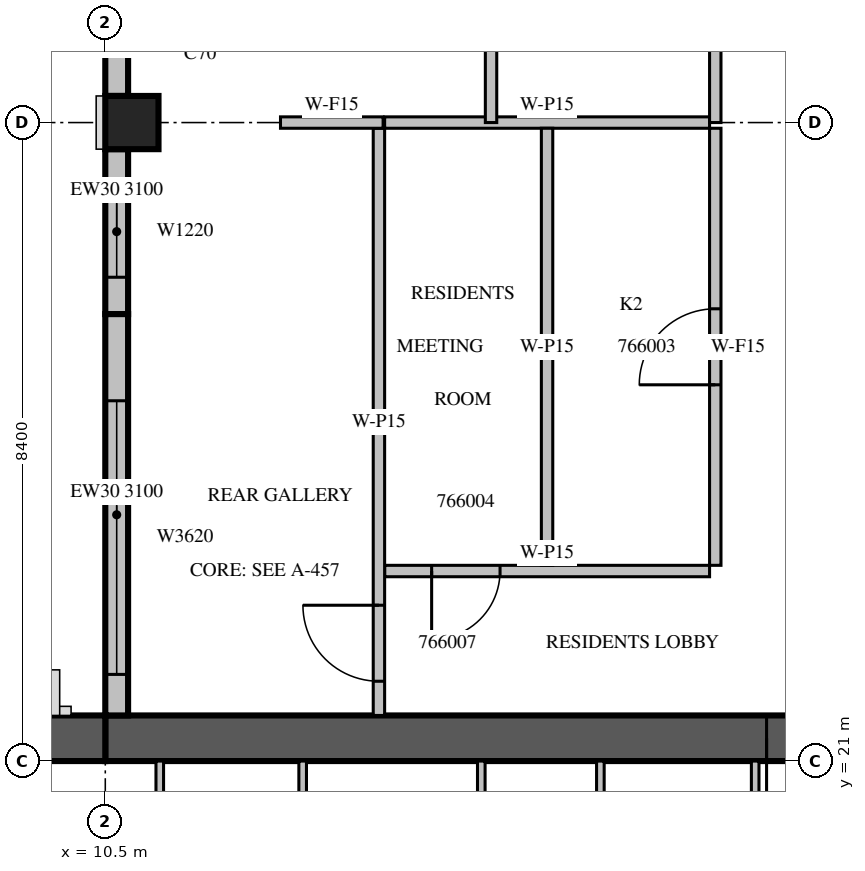
"""IFC4 building model, lengths in metres.
Left out: names, types, materials, properties, quantities, classifications, styles, units other than length and angle.
Written with IfcOpenShell. Run it as: python <this file> out.ifc"""

import sys

from ifc_helpers import new_model, si_unit, direction, frame, frame_2d, origin, origin_2d, place, context, subcontext, project, spatial, rectangle, extrude, source, transform, mapped, element, fill, save


model = new_model("IFC4")
c1 = context("Model", 3, precision=1e-05, world=origin(), true_north=direction((0.0, 1.0)))
c2 = subcontext(c1, "Body", "Model", "MODEL_VIEW")
j1 = project(units=[si_unit("LENGTHUNIT", "METRE"), si_unit("PLANEANGLEUNIT", "RADIAN")], contexts=[c1])
p1 = place(None, origin())
s1 = spatial("IfcSite", under=j1, at=p1, CompositionType="ELEMENT")
p2 = place(p1, origin())
s2 = spatial("IfcBuilding", under=s1, at=p2, CompositionType="ELEMENT")
p3 = place(p2, frame((0.0, 0.0, 291.5)))
s3 = spatial("IfcBuildingStorey", under=s2, at=p3, CompositionType="ELEMENT", Elevation=291.5)
m1 = source(origin(), c2, "Body", "SweptSolid", [
    extrude(rectangle(XDim=0.7, YDim=0.7, at=origin_2d()), origin(), (0.0, 0.0, 1.0), 3.5),
])
p4 = place(p3, frame((10.85, 29.4, 0.0), z_axis=(0.0, 0.0, 1.0), x_axis=(1.0, 0.0, 0.0)))
e1 = element("IfcColumn", 1, at=p4, inside=s3, PredefinedType="COLUMN", context=c2, shape_type="MappedRepresentation", body=[
    mapped(m1, transform((0.0, 0.0, 0.0), scale=1.0)),
])
m2 = source(origin(), c2, "Body", "SweptSolid", [
    extrude(rectangle(XDim=11.1, YDim=0.6, at=frame_2d((5.55, 0.0))), origin(), (0.0, 0.0, 1.0), 3.5),
])
p5 = place(p3, frame((10.5, 21.3, 0.0), z_axis=(0.0, 0.0, 1.0), x_axis=(1.0, 0.0, 0.0)))
e2 = element("IfcWall", 2, at=p5, inside=s3, PredefinedType="SHEAR", context=c2, shape_type="MappedRepresentation", body=[
    mapped(m2, transform((0.0, 0.0, 0.0), scale=1.0)),
])
m3 = source(origin(), c2, "Body", "SweptSolid", [
    extrude(rectangle(XDim=1.2, YDim=2.1, at=frame_2d((0.6, 1.05))), frame((0.0, 0.31, 0.0), z_axis=(0.0, -1.0, 0.0), x_axis=(1.0, 0.0, 0.0)), (0.0, 0.0, 1.0), 0.62),
])
p6 = place(p5, frame((8.7, 0.0, 0.0)))
e3 = element("IfcOpeningElement", 3, at=p6, cuts=e2, PredefinedType="OPENING", context=c2, shape_type="MappedRepresentation", body=[
    mapped(m3, transform((0.0, 0.0, 0.0), scale=1.0)),
])
m4 = source(origin(), c2, "Body", "SweptSolid", [
    extrude(rectangle(XDim=6.6, YDim=0.6, at=frame_2d((3.3, 0.0))), origin(), (0.0, 0.0, 1.0), 3.5),
])
p7 = place(p3, frame((3.9, 21.3, 0.0), z_axis=(0.0, 0.0, 1.0), x_axis=(1.0, 0.0, 0.0)))
e4 = element("IfcWall", 4, at=p7, inside=s3, PredefinedType="SHEAR", context=c2, shape_type="MappedRepresentation", body=[
    mapped(m4, transform((0.0, 0.0, 0.0), scale=1.0)),
])
m5 = source(origin(), c2, "Body", "SweptSolid", [
    extrude(rectangle(XDim=1.2, YDim=2.4, at=frame_2d((0.6, 1.2))), frame((0.0, 0.31, 0.0), z_axis=(0.0, -1.0, 0.0), x_axis=(1.0, 0.0, 0.0)), (0.0, 0.0, 1.0), 0.62),
])
p8 = place(p7, frame((1.5, 0.0, 0.6)))
e5 = element("IfcOpeningElement", 5, at=p8, cuts=e4, PredefinedType="OPENING", context=c2, shape_type="MappedRepresentation", body=[
    mapped(m5, transform((0.0, 0.0, 0.0), scale=1.0)),
])
p9 = place(p7, frame((3.6, 0.0, 0.6)))
e6 = element("IfcOpeningElement", 6, at=p9, cuts=e4, PredefinedType="OPENING", context=c2, shape_type="MappedRepresentation", body=[
    mapped(m5, transform((0.0, 0.0, 0.0), scale=1.0)),
])
m6 = source(origin(), c2, "Body", "SweptSolid", [
    extrude(rectangle(XDim=1.33, YDim=0.3, at=frame_2d((0.665, 0.0))), origin(), (0.0, 0.0, 1.0), 3.1),
])
p10 = place(p3, frame((10.65, 31.08, 0.0), z_axis=(0.0, 0.0, 1.0), x_axis=(0.0, -1.0, 0.0)))
e7 = element("IfcWall", 7, at=p10, inside=s3, PredefinedType="STANDARD", context=c2, shape_type="MappedRepresentation", body=[
    mapped(m6, transform((0.0, 0.0, 0.0), scale=1.0)),
])
m7 = source(origin(), c2, "Body", "SweptSolid", [
    extrude(rectangle(XDim=2.17, YDim=0.3, at=frame_2d((1.085, 0.0))), origin(), (0.0, 0.0, 1.0), 3.1),
])
p11 = place(p3, frame((10.65, 29.05, 0.0), z_axis=(0.0, 0.0, 1.0), x_axis=(0.0, -1.0, 0.0)))
e8 = element("IfcWall", 8, at=p11, inside=s3, PredefinedType="STANDARD", context=c2, shape_type="MappedRepresentation", body=[
    mapped(m7, transform((0.0, 0.0, 0.0), scale=1.0)),
])
m8 = source(origin(), c2, "Body", "SweptSolid", [
    extrude(rectangle(XDim=1.2, YDim=2.0, at=frame_2d((0.6, 1.0))), frame((0.0, 0.16, 0.0), z_axis=(0.0, -1.0, 0.0), x_axis=(1.0, 0.0, 0.0)), (0.0, 0.0, 1.0), 0.32),
])
p12 = place(p11, frame((0.485, 0.0, 0.6)))
e9 = element("IfcOpeningElement", 9, at=p12, cuts=e8, PredefinedType="OPENING", context=c2, shape_type="MappedRepresentation", body=[
    mapped(m8, transform((0.0, 0.0, 0.0), scale=1.0)),
])
m9 = source(origin(), c2, "Body", "SweptSolid", [
    extrude(rectangle(XDim=5.28, YDim=0.3, at=frame_2d((2.64, 0.0))), origin(), (0.0, 0.0, 1.0), 3.1),
])
p13 = place(p3, frame((10.65, 26.88, 0.0), z_axis=(0.0, 0.0, 1.0), x_axis=(0.0, -1.0, 0.0)))
e10 = element("IfcWall", 10, at=p13, inside=s3, PredefinedType="STANDARD", context=c2, shape_type="MappedRepresentation", body=[
    mapped(m9, transform((0.0, 0.0, 0.0), scale=1.0)),
])
m10 = source(origin(), c2, "Body", "SweptSolid", [
    extrude(rectangle(XDim=3.6, YDim=2.0, at=frame_2d((1.8, 1.0))), frame((0.0, 0.16, 0.0), z_axis=(0.0, -1.0, 0.0), x_axis=(1.0, 0.0, 0.0)), (0.0, 0.0, 1.0), 0.32),
])
p14 = place(p13, frame((1.14, 0.0, 0.6)))
e11 = element("IfcOpeningElement", 11, at=p14, cuts=e10, PredefinedType="OPENING", context=c2, shape_type="MappedRepresentation", body=[
    mapped(m10, transform((0.0, 0.0, 0.0), scale=1.0)),
])
p15 = place(p3, frame((11.217, 19.7, 0.0), z_axis=(0.0, 0.0, 1.0), x_axis=(0.0, 1.0, 0.0)))
e12 = element("IfcWall", 12, at=p15, inside=s3, PredefinedType="PARTITIONING", context=c2, shape_type="SweptSolid", body=[
    extrude(rectangle(XDim=1.3, YDim=0.1, at=frame_2d((0.65, 0.0))), origin(), (0.0, 0.0, 1.0), 3.1),
])
m11 = source(origin(), c2, "Body", "SweptSolid", [
    extrude(rectangle(XDim=1.3, YDim=0.1, at=frame_2d((0.65, 0.0))), origin(), (0.0, 0.0, 1.0), 3.1),
])
for number, where, z_axis, x_axis in (
    (13, (13.097, 19.7, 0.0), (0.0, 0.0, 1.0), (0.0, 1.0, 0.0)),
    (14, (15.447, 19.7, 0.0), (0.0, 0.0, 1.0), (0.0, 1.0, 0.0)),
    (15, (17.013, 19.7, 0.0), (0.0, 0.0, 1.0), (0.0, 1.0, 0.0)),
    (16, (19.05, 19.7, 0.0), (0.0, 0.0, 1.0), (0.0, 1.0, 0.0)),
):
    element("IfcWall", number, at=place(p3, frame(where, z_axis=z_axis, x_axis=x_axis)), inside=s3, PredefinedType="PARTITIONING", context=c2, shape_type="MappedRepresentation", body=[
        mapped(m11, transform((0.0, 0.0, 0.0), scale=1.0)),
    ])
p16 = place(p3, frame((14.175, 23.5, 0.0), z_axis=(0.0, 0.0, 1.0), x_axis=(1.0, 0.0, 0.0)))
e17 = element("IfcWall", 17, at=p16, inside=s3, PredefinedType="PARTITIONING", context=c2, shape_type="SweptSolid", body=[
    extrude(rectangle(XDim=4.275, YDim=0.15, at=frame_2d((2.138, 0.0))), origin(), (0.0, 0.0, 1.0), 3.1),
])
m12 = source(origin(), c2, "Body", "SweptSolid", [
    extrude(rectangle(XDim=0.9, YDim=2.1, at=frame_2d((0.45, 1.05))), frame((0.0, 0.085, 0.0), z_axis=(0.0, -1.0, 0.0), x_axis=(1.0, 0.0, 0.0)), (0.0, 0.0, 1.0), 0.17),
])
p17 = place(p16, frame((0.619, 0.0, 0.0)))
e18 = element("IfcOpeningElement", 18, at=p17, cuts=e17, PredefinedType="OPENING", context=c2, shape_type="MappedRepresentation", body=[
    mapped(m12, transform((0.0, 0.0, 0.0), scale=1.0)),
])
m13 = source(origin(), c2, "Body", "SweptSolid", [
    extrude(rectangle(XDim=4.275, YDim=0.15, at=frame_2d((2.138, 0.0))), origin(), (0.0, 0.0, 1.0), 3.1),
])
p18 = place(p3, frame((18.45, 29.4, 0.0), z_axis=(0.0, 0.0, 1.0), x_axis=(-1.0, 0.0, 0.0)))
e19 = element("IfcWall", 19, at=p18, inside=s3, PredefinedType="PARTITIONING", context=c2, shape_type="MappedRepresentation", body=[
    mapped(m13, transform((0.0, 0.0, 0.0), scale=1.0)),
])
m14 = source(origin(), c2, "Body", "SweptSolid", [
    extrude(rectangle(XDim=5.75, YDim=0.15, at=frame_2d((2.875, 0.0))), origin(), (0.0, 0.0, 1.0), 3.1),
])
p19 = place(p3, frame((18.525, 23.575, 0.0), z_axis=(0.0, 0.0, 1.0), x_axis=(0.0, 1.0, 0.0)))
e20 = element("IfcWall", 20, at=p19, inside=s3, PredefinedType="PARTITIONING", context=c2, shape_type="MappedRepresentation", body=[
    mapped(m14, transform((0.0, 0.0, 0.0), scale=1.0)),
])
m15 = source(origin(), c2, "Body", "SweptSolid", [
    extrude(rectangle(XDim=1.0, YDim=2.1, at=frame_2d((0.5, 1.05))), frame((0.0, 0.085, 0.0), z_axis=(0.0, -1.0, 0.0), x_axis=(1.0, 0.0, 0.0)), (0.0, 0.0, 1.0), 0.17),
])
p20 = place(p19, frame((2.375, 0.0, 0.0)))
e21 = element("IfcOpeningElement", 21, at=p20, cuts=e20, PredefinedType="OPENING", context=c2, shape_type="MappedRepresentation", body=[
    mapped(m15, transform((0.0, 0.0, 0.0), scale=1.0)),
])
p21 = place(p3, frame((16.312, 23.575, 0.0), z_axis=(0.0, 0.0, 1.0), x_axis=(0.0, 1.0, 0.0)))
e22 = element("IfcWall", 22, at=p21, inside=s3, PredefinedType="PARTITIONING", context=c2, shape_type="MappedRepresentation", body=[
    mapped(m14, transform((0.0, 0.0, 0.0), scale=1.0)),
])
m16 = source(origin(), c2, "Body", "SweptSolid", [
    extrude(rectangle(XDim=7.725, YDim=0.15, at=frame_2d((3.862, 0.0))), origin(), (0.0, 0.0, 1.0), 3.1),
])
p22 = place(p3, frame((14.1, 29.325, 0.0), z_axis=(0.0, 0.0, 1.0), x_axis=(0.0, -1.0, 0.0)))
e23 = element("IfcWall", 23, at=p22, inside=s3, PredefinedType="PARTITIONING", context=c2, shape_type="MappedRepresentation", body=[
    mapped(m16, transform((0.0, 0.0, 0.0), scale=1.0)),
])
p23 = place(p22, frame((6.275, 0.0, 0.0)))
e24 = element("IfcOpeningElement", 24, at=p23, cuts=e23, PredefinedType="OPENING", context=c2, shape_type="MappedRepresentation", body=[
    mapped(m15, transform((0.0, 0.0, 0.0), scale=1.0)),
])
m17 = source(origin(), c2, "Body", "SweptSolid", [
    extrude(rectangle(XDim=1.35, YDim=0.15, at=frame_2d((0.675, 0.0))), origin(), (0.0, 0.0, 1.0), 3.1),
])
p24 = place(p3, frame((14.155, 29.4, 0.0), z_axis=(0.0, 0.0, 1.0), x_axis=(-1.0, 0.0, 0.0)))
e25 = element("IfcWall", 25, at=p24, inside=s3, PredefinedType="PARTITIONING", context=c2, shape_type="MappedRepresentation", body=[
    mapped(m17, transform((0.0, 0.0, 0.0), scale=1.0)),
])
m18 = source(origin(), c2, "Body", "SweptSolid", [
    extrude(rectangle(XDim=8.4, YDim=0.15, at=frame_2d((4.2, 0.0))), origin(), (0.0, 0.0, 1.0), 3.1),
])
p25 = place(p3, frame((15.575, 29.4, 0.0), z_axis=(0.0, 0.0, 1.0), x_axis=(0.0, 1.0, 0.0)))
e26 = element("IfcWall", 26, at=p25, inside=s3, PredefinedType="PARTITIONING", context=c2, shape_type="MappedRepresentation", body=[
    mapped(m18, transform((0.0, 0.0, 0.0), scale=1.0)),
])
m19 = source(origin(), c2, "Body", "SweptSolid", [
    extrude(rectangle(XDim=1.2, YDim=2.1, at=frame_2d((0.6, 1.05))), frame((0.0, 0.085, 0.0), z_axis=(0.0, -1.0, 0.0), x_axis=(1.0, 0.0, 0.0)), (0.0, 0.0, 1.0), 0.17),
])
p26 = place(p25, frame((1.552, 0.0, 0.0)))
e27 = element("IfcOpeningElement", 27, at=p26, cuts=e26, PredefinedType="OPENING", context=c2, shape_type="MappedRepresentation", body=[
    mapped(m19, transform((0.0, 0.0, 0.0), scale=1.0)),
])
p27 = place(p3, frame((18.525, 29.4, 0.0), z_axis=(0.0, 0.0, 1.0), x_axis=(0.0, 1.0, 0.0)))
e28 = element("IfcWall", 28, at=p27, inside=s3, PredefinedType="PARTITIONING", context=c2, shape_type="MappedRepresentation", body=[
    mapped(m18, transform((0.0, 0.0, 0.0), scale=1.0)),
])
p28 = place(p27, frame((1.502, 0.0, 0.0)))
e29 = element("IfcOpeningElement", 29, at=p28, cuts=e28, PredefinedType="OPENING", context=c2, shape_type="MappedRepresentation", body=[
    mapped(m19, transform((0.0, 0.0, 0.0), scale=1.0)),
])
p29 = place(p27, frame((4.727, 0.0, 0.0)))
e30 = element("IfcOpeningElement", 30, at=p29, cuts=e28, PredefinedType="OPENING", context=c2, shape_type="MappedRepresentation", body=[
    mapped(m12, transform((0.0, 0.0, 0.0), scale=1.0)),
])
p30 = place(p27, frame((6.824, 0.0, 0.0)))
e31 = element("IfcOpeningElement", 31, at=p30, cuts=e28, PredefinedType="OPENING", context=c2, shape_type="MappedRepresentation", body=[
    mapped(m12, transform((0.0, 0.0, 0.0), scale=1.0)),
])
m20 = source(origin(), c2, "Body", "SweptSolid", [
    extrude(rectangle(XDim=1.2, YDim=2.0, at=frame_2d((0.6, 1.0))), frame((0.0, 0.03, 0.0), z_axis=(0.0, -1.0, 0.0), x_axis=(1.0, 0.0, 0.0)), (0.0, 0.0, 1.0), 0.06),
])
p31 = place(p12, origin())
e32 = element("IfcWindow", 32, at=p31, inside=s3, PartitioningType="SINGLE_PANEL", PredefinedType="WINDOW", context=c2, shape_type="MappedRepresentation", body=[
    mapped(m20, transform((0.0, 0.0, 0.0), scale=1.0)),
])
fill(e9, e32)
m21 = source(origin(), c2, "Body", "SweptSolid", [
    extrude(rectangle(XDim=3.6, YDim=2.0, at=frame_2d((1.8, 1.0))), frame((0.0, 0.03, 0.0), z_axis=(0.0, -1.0, 0.0), x_axis=(1.0, 0.0, 0.0)), (0.0, 0.0, 1.0), 0.06),
])
p32 = place(p14, origin())
e33 = element("IfcWindow", 33, at=p32, inside=s3, PartitioningType="SINGLE_PANEL", PredefinedType="WINDOW", context=c2, shape_type="MappedRepresentation", body=[
    mapped(m21, transform((0.0, 0.0, 0.0), scale=1.0)),
])
fill(e11, e33)
m22 = source(origin(), c2, "Body", "SweptSolid", [
    extrude(rectangle(XDim=1.2, YDim=2.1, at=frame_2d((0.6, 1.05))), frame((0.0, 0.025, 0.0), z_axis=(0.0, -1.0, 0.0), x_axis=(1.0, 0.0, 0.0)), (0.0, 0.0, 1.0), 0.05),
])
p33 = place(p6, origin())
e34 = element("IfcDoor", 34, at=p33, inside=s3, OperationType="SINGLE_SWING_RIGHT", PredefinedType="DOOR", context=c2, shape_type="MappedRepresentation", body=[
    mapped(m22, transform((0.0, 0.0, 0.0), scale=1.0)),
])
fill(e3, e34)
m23 = source(origin(), c2, "Body", "SweptSolid", [
    extrude(rectangle(XDim=1.0, YDim=2.1, at=frame_2d((0.5, 1.05))), frame((0.0, 0.025, 0.0), z_axis=(0.0, -1.0, 0.0), x_axis=(1.0, 0.0, 0.0)), (0.0, 0.0, 1.0), 0.05),
])
p34 = place(p20, origin())
e35 = element("IfcDoor", 35, at=p34, inside=s3, OperationType="SINGLE_SWING_LEFT", PredefinedType="DOOR", context=c2, shape_type="MappedRepresentation", body=[
    mapped(m23, transform((0.0, 0.0, 0.0), scale=1.0)),
])
fill(e21, e35)
m24 = source(origin(), c2, "Body", "SweptSolid", [
    extrude(rectangle(XDim=0.9, YDim=2.1, at=frame_2d((0.45, 1.05))), frame((0.0, 0.025, 0.0), z_axis=(0.0, -1.0, 0.0), x_axis=(1.0, 0.0, 0.0)), (0.0, 0.0, 1.0), 0.05),
])
p35 = place(p17, origin())
e36 = element("IfcDoor", 36, at=p35, inside=s3, OperationType="SINGLE_SWING_RIGHT", PredefinedType="DOOR", context=c2, shape_type="MappedRepresentation", body=[
    mapped(m24, transform((0.0, 0.0, 0.0), scale=1.0)),
])
fill(e18, e36)
p36 = place(p23, origin())
e37 = element("IfcDoor", 37, at=p36, inside=s3, OperationType="SINGLE_SWING_RIGHT", PredefinedType="DOOR", context=c2, shape_type="MappedRepresentation", body=[
    mapped(m23, transform((0.0, 0.0, 0.0), scale=1.0)),
])
fill(e24, e37)
save(model, sys.argv[1])
